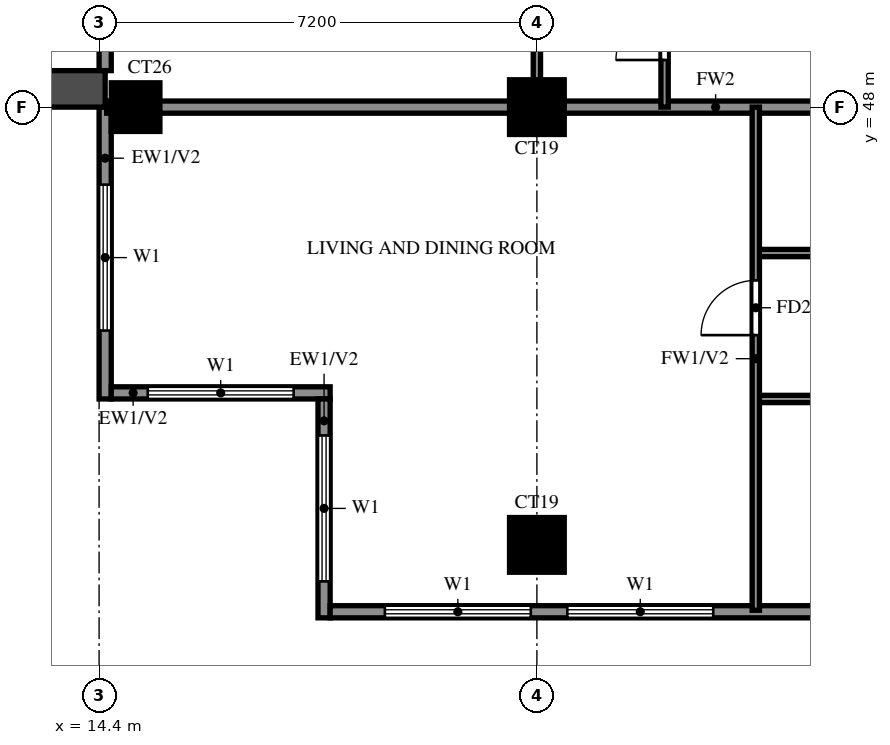
"""IFC4 building model, lengths in metres.
Left out: names, types, materials, properties, quantities, classifications, styles, units other than length and angle.
Written with IfcOpenShell. Run it as: python <this file> out.ifc"""

import sys

from ifc_helpers import new_model, si_unit, direction, frame, frame_2d, origin, origin_2d, place, context, subcontext, project, spatial, rectangle, extrude, source, transform, mapped, element, fill, save


model = new_model("IFC4")
c1 = context("Model", 3, precision=1e-05, world=origin(), true_north=direction((0.0, 1.0)))
c2 = subcontext(c1, "Body", "Model", "MODEL_VIEW")
j1 = project(units=[si_unit("LENGTHUNIT", "METRE"), si_unit("PLANEANGLEUNIT", "RADIAN")], contexts=[c1])
p1 = place(None, origin())
s1 = spatial("IfcSite", under=j1, at=p1, CompositionType="ELEMENT")
p2 = place(p1, origin())
s2 = spatial("IfcBuilding", under=s1, at=p2, CompositionType="ELEMENT")
p3 = place(p2, frame((0.0, 0.0, 195.5)))
s3 = spatial("IfcBuildingStorey", under=s2, at=p3, CompositionType="ELEMENT", Elevation=195.5)
m1 = source(origin(), c2, "Body", "SweptSolid", [
    extrude(rectangle(XDim=0.9, YDim=0.9, at=origin_2d()), origin(), (0.0, 0.0, 1.0), 3.2),
])
p4 = place(p3, frame((21.6, 40.8, 0.0), z_axis=(0.0, 0.0, 1.0), x_axis=(1.0, 0.0, 0.0)))
e1 = element("IfcColumn", 1, at=p4, inside=s3, PredefinedType="COLUMN", context=c2, shape_type="MappedRepresentation", body=[
    mapped(m1, transform((0.0, 0.0, 0.0))),
])
m2 = source(origin(), c2, "Body", "SweptSolid", [
    extrude(rectangle(XDim=0.8, YDim=0.8, at=origin_2d()), origin(), (0.0, 0.0, 1.0), 3.2),
])
p5 = place(p3, frame((15.0, 48.0, 0.0), z_axis=(0.0, 0.0, 1.0), x_axis=(1.0, 0.0, 0.0)))
e2 = element("IfcColumn", 2, at=p5, inside=s3, PredefinedType="COLUMN", context=c2, shape_type="MappedRepresentation", body=[
    mapped(m2, transform((0.0, 0.0, 0.0))),
])
p6 = place(p3, frame((21.6, 48.0, 0.0), z_axis=(0.0, 0.0, 1.0), x_axis=(1.0, 0.0, 0.0)))
e3 = element("IfcColumn", 3, at=p6, inside=s3, PredefinedType="COLUMN", context=c2, shape_type="MappedRepresentation", body=[
    mapped(m1, transform((0.0, 0.0, 0.0))),
])
p7 = place(p3, frame((14.5, 54.6, 0.0), z_axis=(0.0, 0.0, 1.0), x_axis=(0.0, -1.0, 0.0)))
e4 = element("IfcWall", 4, at=p7, inside=s3, PredefinedType="SOLIDWALL", context=c2, shape_type="SweptSolid", body=[
    extrude(rectangle(XDim=6.0, YDim=0.2, at=frame_2d((3.0, 0.0))), origin(), (0.0, 0.0, 1.0), 3.2),
])
p8 = place(p7, frame((0.9, 0.0, 0.0)))
e5 = element("IfcOpeningElement", 5, at=p8, cuts=e4, PredefinedType="OPENING", context=c2, shape_type="SweptSolid", body=[
    extrude(rectangle(XDim=1.8, YDim=2.4, at=frame_2d((0.9, 1.2))), frame((0.0, 0.11, 0.0), z_axis=(0.0, -1.0, 0.0), x_axis=(1.0, 0.0, 0.0)), (0.0, 0.0, 1.0), 0.22),
])
p9 = place(p7, frame((3.5, 0.0, 0.6)))
e6 = element("IfcOpeningElement", 6, at=p9, cuts=e4, PredefinedType="OPENING", context=c2, shape_type="SweptSolid", body=[
    extrude(rectangle(XDim=1.8, YDim=2.4, at=frame_2d((0.9, 1.2))), frame((0.0, 0.11, 0.0), z_axis=(0.0, -1.0, 0.0), x_axis=(1.0, 0.0, 0.0)), (0.0, 0.0, 1.0), 0.22),
])
p10 = place(p3, frame((14.5, 48.0, 0.0), z_axis=(0.0, 0.0, 1.0), x_axis=(0.0, -1.0, 0.0)))
e7 = element("IfcWall", 7, at=p10, inside=s3, PredefinedType="SOLIDWALL", context=c2, shape_type="SweptSolid", body=[
    extrude(rectangle(XDim=4.8, YDim=0.2, at=frame_2d((2.4, 0.0))), origin(), (0.0, 0.0, 1.0), 3.2),
])
p11 = place(p10, frame((1.275, 0.0, 0.6)))
e8 = element("IfcOpeningElement", 8, at=p11, cuts=e7, PredefinedType="OPENING", context=c2, shape_type="SweptSolid", body=[
    extrude(rectangle(XDim=2.4, YDim=2.4, at=frame_2d((1.2, 1.2))), frame((0.0, 0.11, 0.0), z_axis=(0.0, -1.0, 0.0), x_axis=(1.0, 0.0, 0.0)), (0.0, 0.0, 1.0), 0.22),
])
p12 = place(p3, frame((14.6, 43.3, 0.0), z_axis=(0.0, 0.0, 1.0), x_axis=(1.0, 0.0, 0.0)))
e9 = element("IfcWall", 9, at=p12, inside=s3, PredefinedType="SOLIDWALL", context=c2, shape_type="SweptSolid", body=[
    extrude(rectangle(XDim=3.6, YDim=0.2, at=frame_2d((1.8, 0.0))), origin(), (0.0, 0.0, 1.0), 3.2),
])
p13 = place(p12, frame((0.6, 0.0, 0.6)))
e10 = element("IfcOpeningElement", 10, at=p13, cuts=e9, PredefinedType="OPENING", context=c2, shape_type="SweptSolid", body=[
    extrude(rectangle(XDim=2.4, YDim=2.4, at=frame_2d((1.2, 1.2))), frame((0.0, 0.11, 0.0), z_axis=(0.0, -1.0, 0.0), x_axis=(1.0, 0.0, 0.0)), (0.0, 0.0, 1.0), 0.22),
])
p14 = place(p3, frame((18.1, 43.2, 0.0), z_axis=(0.0, 0.0, 1.0), x_axis=(0.0, -1.0, 0.0)))
e11 = element("IfcWall", 11, at=p14, inside=s3, PredefinedType="SOLIDWALL", context=c2, shape_type="SweptSolid", body=[
    extrude(rectangle(XDim=3.6, YDim=0.2, at=frame_2d((1.8, 0.0))), origin(), (0.0, 0.0, 1.0), 3.2),
])
p15 = place(p14, frame((0.6, 0.0, 0.6)))
e12 = element("IfcOpeningElement", 12, at=p15, cuts=e11, PredefinedType="OPENING", context=c2, shape_type="SweptSolid", body=[
    extrude(rectangle(XDim=2.4, YDim=2.4, at=frame_2d((1.2, 1.2))), frame((0.0, 0.11, 0.0), z_axis=(0.0, -1.0, 0.0), x_axis=(1.0, 0.0, 0.0)), (0.0, 0.0, 1.0), 0.22),
])
p16 = place(p3, frame((18.2, 39.7, 0.0), z_axis=(0.0, 0.0, 1.0), x_axis=(1.0, 0.0, 0.0)))
e13 = element("IfcWall", 13, at=p16, inside=s3, PredefinedType="SOLIDWALL", context=c2, shape_type="SweptSolid", body=[
    extrude(rectangle(XDim=23.8, YDim=0.2, at=frame_2d((11.9, 0.0))), origin(), (0.0, 0.0, 1.0), 3.2),
])
p17 = place(p16, frame((13.3, 0.0, 0.0)))
e14 = element("IfcOpeningElement", 14, at=p17, cuts=e13, PredefinedType="OPENING", context=c2, shape_type="SweptSolid", body=[
    extrude(rectangle(XDim=1.8, YDim=2.4, at=frame_2d((0.9, 1.2))), frame((0.0, 0.11, 0.0), z_axis=(0.0, -1.0, 0.0), x_axis=(1.0, 0.0, 0.0)), (0.0, 0.0, 1.0), 0.22),
])
p18 = place(p16, frame((0.9, 0.0, 0.6)))
e15 = element("IfcOpeningElement", 15, at=p18, cuts=e13, PredefinedType="OPENING", context=c2, shape_type="SweptSolid", body=[
    extrude(rectangle(XDim=2.4, YDim=2.4, at=frame_2d((1.2, 1.2))), frame((0.0, 0.11, 0.0), z_axis=(0.0, -1.0, 0.0), x_axis=(1.0, 0.0, 0.0)), (0.0, 0.0, 1.0), 0.22),
])
p19 = place(p16, frame((3.9, 0.0, 0.6)))
e16 = element("IfcOpeningElement", 16, at=p19, cuts=e13, PredefinedType="OPENING", context=c2, shape_type="SweptSolid", body=[
    extrude(rectangle(XDim=2.4, YDim=2.4, at=frame_2d((1.2, 1.2))), frame((0.0, 0.11, 0.0), z_axis=(0.0, -1.0, 0.0), x_axis=(1.0, 0.0, 0.0)), (0.0, 0.0, 1.0), 0.22),
])
p20 = place(p16, frame((10.9, 0.0, 0.6)))
e17 = element("IfcOpeningElement", 17, at=p20, cuts=e13, PredefinedType="OPENING", context=c2, shape_type="SweptSolid", body=[
    extrude(rectangle(XDim=1.8, YDim=2.4, at=frame_2d((0.9, 1.2))), frame((0.0, 0.11, 0.0), z_axis=(0.0, -1.0, 0.0), x_axis=(1.0, 0.0, 0.0)), (0.0, 0.0, 1.0), 0.22),
])
p21 = place(p16, frame((8.35, 0.0, 1.5)))
e18 = element("IfcOpeningElement", 18, at=p21, cuts=e13, PredefinedType="OPENING", context=c2, shape_type="SweptSolid", body=[
    extrude(rectangle(XDim=0.9, YDim=0.9, at=frame_2d((0.45, 0.45))), frame((0.0, 0.11, 0.0), z_axis=(0.0, -1.0, 0.0), x_axis=(1.0, 0.0, 0.0)), (0.0, 0.0, 1.0), 0.22),
])
p22 = place(p3, frame((14.5, 48.3, 0.0), z_axis=(0.0, 0.0, 1.0), x_axis=(-1.0, 0.0, 0.0)))
e19 = element("IfcWall", 19, at=p22, inside=s3, PredefinedType="SOLIDWALL", context=c2, shape_type="SweptSolid", body=[
    extrude(rectangle(XDim=2.8, YDim=0.6, at=frame_2d((1.4, 0.0))), origin(), (0.0, 0.0, 1.0), 2.85),
])
p23 = place(p3, frame((14.525, 48.0, 0.0), z_axis=(0.0, 0.0, 1.0), x_axis=(1.0, 0.0, 0.0)))
e20 = element("IfcWall", 20, at=p23, inside=s3, PredefinedType="SOLIDWALL", context=c2, shape_type="SweptSolid", body=[
    extrude(rectangle(XDim=19.075, YDim=0.2, at=frame_2d((9.538, 0.0))), origin(), (0.0, 0.0, 1.0), 3.2),
])
p24 = place(p3, frame((25.2, 43.2, 0.0), z_axis=(0.0, 0.0, 1.0), x_axis=(1.0, 0.0, 0.0)))
e21 = element("IfcWall", 21, at=p24, inside=s3, PredefinedType="PARTITIONING", context=c2, shape_type="SweptSolid", body=[
    extrude(rectangle(XDim=3.6, YDim=0.12, at=frame_2d((1.8, 0.0))), origin(), (0.0, 0.0, 1.0), 3.2),
])
p25 = place(p3, frame((25.2, 45.6, 0.0), z_axis=(0.0, 0.0, 1.0), x_axis=(1.0, 0.0, 0.0)))
e22 = element("IfcWall", 22, at=p25, inside=s3, PredefinedType="PARTITIONING", context=c2, shape_type="SweptSolid", body=[
    extrude(rectangle(XDim=6.0, YDim=0.12, at=frame_2d((3.0, 0.0))), origin(), (0.0, 0.0, 1.0), 3.2),
])
p26 = place(p25, frame((2.55, 0.0, 0.0)))
e23 = element("IfcOpeningElement", 23, at=p26, cuts=e22, PredefinedType="OPENING", context=c2, shape_type="SweptSolid", body=[
    extrude(rectangle(XDim=0.9, YDim=2.1, at=frame_2d((0.45, 1.05))), frame((0.0, 0.07, 0.0), z_axis=(0.0, -1.0, 0.0), x_axis=(1.0, 0.0, 0.0)), (0.0, 0.0, 1.0), 0.14),
])
p27 = place(p3, frame((21.6, 48.0, 0.0), z_axis=(0.0, 0.0, 1.0), x_axis=(0.0, 1.0, 0.0)))
e24 = element("IfcWall", 24, at=p27, inside=s3, PredefinedType="PARTITIONING", context=c2, shape_type="SweptSolid", body=[
    extrude(rectangle(XDim=18.0, YDim=0.12, at=frame_2d((9.0, 0.0))), origin(), (0.0, 0.0, 1.0), 3.2),
])
p28 = place(p27, frame((1.35, 0.0, 0.0)))
e25 = element("IfcOpeningElement", 25, at=p28, cuts=e24, PredefinedType="OPENING", context=c2, shape_type="SweptSolid", body=[
    extrude(rectangle(XDim=0.9, YDim=2.1, at=frame_2d((0.45, 1.05))), frame((0.0, 0.07, 0.0), z_axis=(0.0, -1.0, 0.0), x_axis=(1.0, 0.0, 0.0)), (0.0, 0.0, 1.0), 0.14),
])
p29 = place(p27, frame((7.95, 0.0, 0.0)))
e26 = element("IfcOpeningElement", 26, at=p29, cuts=e24, PredefinedType="OPENING", context=c2, shape_type="SweptSolid", body=[
    extrude(rectangle(XDim=1.5, YDim=2.1, at=frame_2d((0.75, 1.05))), frame((0.0, 0.07, 0.0), z_axis=(0.0, -1.0, 0.0), x_axis=(1.0, 0.0, 0.0)), (0.0, 0.0, 1.0), 0.14),
])
p30 = place(p27, frame((12.15, 0.0, 0.0)))
e27 = element("IfcOpeningElement", 27, at=p30, cuts=e24, PredefinedType="OPENING", context=c2, shape_type="SweptSolid", body=[
    extrude(rectangle(XDim=0.9, YDim=2.1, at=frame_2d((0.45, 1.05))), frame((0.0, 0.07, 0.0), z_axis=(0.0, -1.0, 0.0), x_axis=(1.0, 0.0, 0.0)), (0.0, 0.0, 1.0), 0.14),
])
p31 = place(p27, frame((15.75, 0.0, 0.0)))
e28 = element("IfcOpeningElement", 28, at=p31, cuts=e24, PredefinedType="OPENING", context=c2, shape_type="SweptSolid", body=[
    extrude(rectangle(XDim=0.9, YDim=2.1, at=frame_2d((0.45, 1.05))), frame((0.0, 0.07, 0.0), z_axis=(0.0, -1.0, 0.0), x_axis=(1.0, 0.0, 0.0)), (0.0, 0.0, 1.0), 0.14),
])
p32 = place(p3, frame((23.7, 48.0, 0.0), z_axis=(0.0, 0.0, 1.0), x_axis=(0.0, 1.0, 0.0)))
e29 = element("IfcWall", 29, at=p32, inside=s3, PredefinedType="PARTITIONING", context=c2, shape_type="SweptSolid", body=[
    extrude(rectangle(XDim=5.2, YDim=0.12, at=frame_2d((2.6, 0.0))), origin(), (0.0, 0.0, 1.0), 3.2),
])
p33 = place(p32, frame((0.775, 0.0, 0.0)))
e30 = element("IfcOpeningElement", 30, at=p33, cuts=e29, PredefinedType="OPENING", context=c2, shape_type="SweptSolid", body=[
    extrude(rectangle(XDim=0.8, YDim=2.1, at=frame_2d((0.4, 1.05))), frame((0.0, 0.07, 0.0), z_axis=(0.0, -1.0, 0.0), x_axis=(1.0, 0.0, 0.0)), (0.0, 0.0, 1.0), 0.14),
])
p34 = place(p3, frame((25.2, 39.725, 0.0), z_axis=(0.0, 0.0, 1.0), x_axis=(0.0, 1.0, 0.0)))
e31 = element("IfcWall", 31, at=p34, inside=s3, PredefinedType="PARTITIONING", context=c2, shape_type="SweptSolid", body=[
    extrude(rectangle(XDim=8.275, YDim=0.12, at=frame_2d((4.137, 0.0))), origin(), (0.0, 0.0, 1.0), 3.2),
])
p35 = place(p34, frame((4.525, 0.0, 0.0)))
e32 = element("IfcOpeningElement", 32, at=p35, cuts=e31, PredefinedType="OPENING", context=c2, shape_type="SweptSolid", body=[
    extrude(rectangle(XDim=0.9, YDim=2.1, at=frame_2d((0.45, 1.05))), frame((0.0, 0.07, 0.0), z_axis=(0.0, -1.0, 0.0), x_axis=(1.0, 0.0, 0.0)), (0.0, 0.0, 1.0), 0.14),
])
p36 = place(p11, origin())
e33 = element("IfcWindow", 33, at=p36, inside=s3, PartitioningType="DOUBLE_PANEL_VERTICAL", PredefinedType="WINDOW", context=c2, shape_type="SweptSolid", body=[
    extrude(rectangle(XDim=2.4, YDim=2.4, at=frame_2d((1.2, 1.2))), frame((0.0, 0.03, 0.0), z_axis=(0.0, -1.0, 0.0), x_axis=(1.0, 0.0, 0.0)), (0.0, 0.0, 1.0), 0.06),
])
fill(e8, e33)
p37 = place(p13, origin())
e34 = element("IfcWindow", 34, at=p37, inside=s3, PartitioningType="DOUBLE_PANEL_VERTICAL", PredefinedType="WINDOW", context=c2, shape_type="SweptSolid", body=[
    extrude(rectangle(XDim=2.4, YDim=2.4, at=frame_2d((1.2, 1.2))), frame((0.0, 0.03, 0.0), z_axis=(0.0, -1.0, 0.0), x_axis=(1.0, 0.0, 0.0)), (0.0, 0.0, 1.0), 0.06),
])
fill(e10, e34)
p38 = place(p15, origin())
e35 = element("IfcWindow", 35, at=p38, inside=s3, PartitioningType="DOUBLE_PANEL_VERTICAL", PredefinedType="WINDOW", context=c2, shape_type="SweptSolid", body=[
    extrude(rectangle(XDim=2.4, YDim=2.4, at=frame_2d((1.2, 1.2))), frame((0.0, 0.03, 0.0), z_axis=(0.0, -1.0, 0.0), x_axis=(1.0, 0.0, 0.0)), (0.0, 0.0, 1.0), 0.06),
])
fill(e12, e35)
p39 = place(p18, origin())
e36 = element("IfcWindow", 36, at=p39, inside=s3, PartitioningType="DOUBLE_PANEL_VERTICAL", PredefinedType="WINDOW", context=c2, shape_type="SweptSolid", body=[
    extrude(rectangle(XDim=2.4, YDim=2.4, at=frame_2d((1.2, 1.2))), frame((0.0, 0.03, 0.0), z_axis=(0.0, -1.0, 0.0), x_axis=(1.0, 0.0, 0.0)), (0.0, 0.0, 1.0), 0.06),
])
fill(e15, e36)
p40 = place(p19, origin())
e37 = element("IfcWindow", 37, at=p40, inside=s3, PartitioningType="DOUBLE_PANEL_VERTICAL", PredefinedType="WINDOW", context=c2, shape_type="SweptSolid", body=[
    extrude(rectangle(XDim=2.4, YDim=2.4, at=frame_2d((1.2, 1.2))), frame((0.0, 0.03, 0.0), z_axis=(0.0, -1.0, 0.0), x_axis=(1.0, 0.0, 0.0)), (0.0, 0.0, 1.0), 0.06),
])
fill(e16, e37)
p41 = place(p35, origin())
e38 = element("IfcDoor", 38, at=p41, inside=s3, OperationType="SINGLE_SWING_LEFT", PredefinedType="DOOR", context=c2, shape_type="SweptSolid", body=[
    extrude(rectangle(XDim=0.9, YDim=2.1, at=frame_2d((0.45, 1.05))), frame((0.0, 0.025, 0.0), z_axis=(0.0, -1.0, 0.0), x_axis=(1.0, 0.0, 0.0)), (0.0, 0.0, 1.0), 0.05),
])
fill(e32, e38)
p42 = place(p33, origin())
e39 = element("IfcDoor", 39, at=p42, inside=s3, OperationType="SINGLE_SWING_LEFT", PredefinedType="DOOR", context=c2, shape_type="SweptSolid", body=[
    extrude(rectangle(XDim=0.8, YDim=2.1, at=frame_2d((0.4, 1.05))), frame((0.0, 0.025, 0.0), z_axis=(0.0, -1.0, 0.0), x_axis=(1.0, 0.0, 0.0)), (0.0, 0.0, 1.0), 0.05),
])
fill(e30, e39)
save(model, sys.argv[1])
